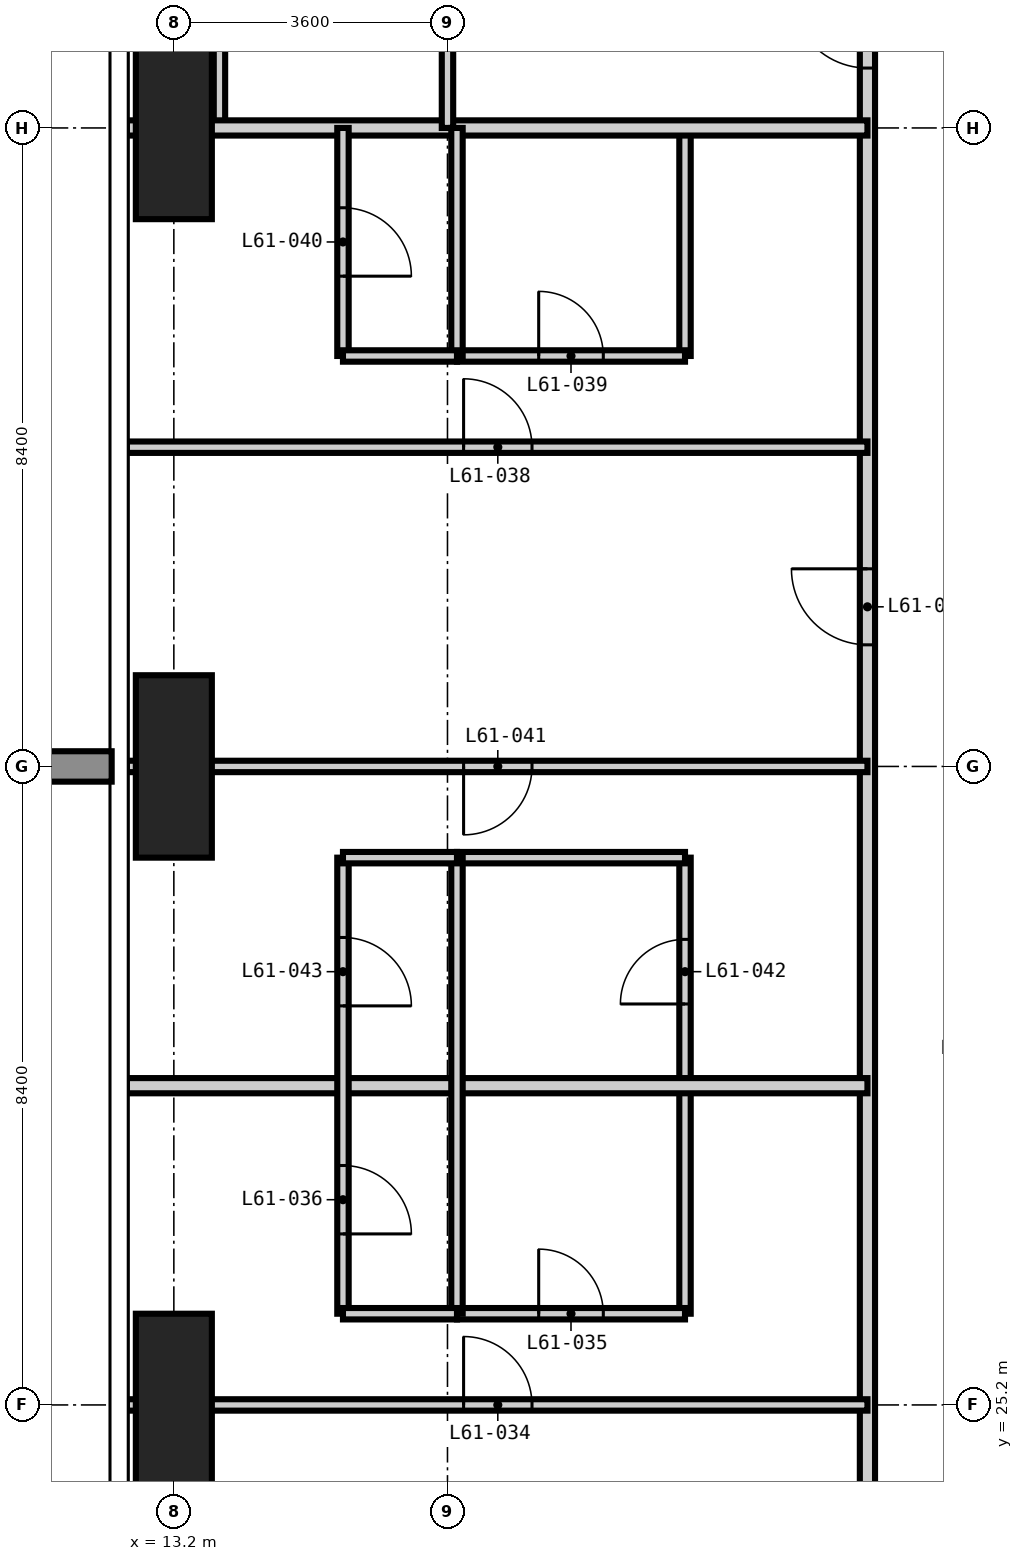
"""IFC4 building model, lengths in metres.
Left out: names, types, materials, properties, quantities, classifications, styles, units other than length and angle.
Written with IfcOpenShell. Run it as: python <this file> out.ifc"""

import sys

from ifc_helpers import new_model, si_unit, direction, frame, frame_2d, origin, origin_2d, place, context, subcontext, project, spatial, rectangle, extrude, element, fill, save


model = new_model("IFC4")
c1 = context("Model", 3, precision=1e-05, world=origin(), true_north=direction((0.0, 1.0)))
c2 = subcontext(c1, "Body", "Model", "MODEL_VIEW")
j1 = project(units=[si_unit("LENGTHUNIT", "METRE"), si_unit("PLANEANGLEUNIT", "RADIAN")], contexts=[c1])
p1 = place(None, origin())
s1 = spatial("IfcSite", under=j1, at=p1, CompositionType="ELEMENT")
p2 = place(p1, origin())
s2 = spatial("IfcBuilding", under=s1, at=p2, CompositionType="ELEMENT")
p3 = place(p2, frame((0.0, 0.0, 237.3)))
s3 = spatial("IfcBuildingStorey", under=s2, at=p3, CompositionType="ELEMENT", Elevation=237.3)
for number, where, z_axis, x_axis in (
    (1, (13.2, 25.2, -0.35), (0.0, 0.0, 1.0), (1.0, 0.0, 0.0)),
    (2, (13.2, 33.6, -0.35), (0.0, 0.0, 1.0), (1.0, 0.0, 0.0)),
    (3, (13.2, 42.0, -0.35), (0.0, 0.0, 1.0), (1.0, 0.0, 0.0)),
):
    element("IfcColumn", number, at=place(p3, frame(where, z_axis=z_axis, x_axis=x_axis)), inside=s3, PredefinedType="COLUMN", context=c2, shape_type="SweptSolid", body=[
        extrude(rectangle(XDim=1.0, YDim=2.4, at=origin_2d()), origin(), (0.0, 0.0, 1.0), 3.9),
    ])
p4 = place(p3, frame((13.8, 42.0, 0.0), z_axis=(0.0, 0.0, 1.0), x_axis=(0.0, 1.0, 0.0)))
e4 = element("IfcWall", 4, at=p4, inside=s3, PredefinedType="PARTITIONING", context=c2, shape_type="SweptSolid", body=[
    extrude(rectangle(XDim=3.6, YDim=0.15, at=frame_2d((1.8, 0.0))), origin(), (0.0, 0.0, 1.0), 3.55),
])
p5 = place(p4, frame((1.375, 0.0, 0.0)))
e5 = element("IfcOpeningElement", 5, at=p5, cuts=e4, PredefinedType="OPENING", context=c2, shape_type="SweptSolid", body=[
    extrude(rectangle(XDim=0.85, YDim=2.1, at=frame_2d((0.425, 1.05))), frame((0.0, 0.085, 0.0), z_axis=(0.0, -1.0, 0.0), x_axis=(1.0, 0.0, 0.0)), (0.0, 0.0, 1.0), 0.17),
])
p6 = place(p3, frame((19.925, 26.4, 0.0), z_axis=(0.0, 0.0, 1.0), x_axis=(0.0, 1.0, 0.0)))
e6 = element("IfcWall", 6, at=p6, inside=s3, PredefinedType="PARTITIONING", context=c2, shape_type="SweptSolid", body=[
    extrude(rectangle(XDim=6.0, YDim=0.15, at=frame_2d((3.0, 0.0))), origin(), (0.0, 0.0, 1.0), 3.55),
])
p7 = place(p6, frame((4.075, 0.0, 0.0)))
e7 = element("IfcOpeningElement", 7, at=p7, cuts=e6, PredefinedType="OPENING", context=c2, shape_type="SweptSolid", body=[
    extrude(rectangle(XDim=0.85, YDim=2.1, at=frame_2d((0.425, 1.05))), frame((0.0, 0.085, 0.0), z_axis=(0.0, -1.0, 0.0), x_axis=(1.0, 0.0, 0.0)), (0.0, 0.0, 1.0), 0.17),
])
p8 = place(p3, frame((19.925, 39.0, 0.0), z_axis=(0.0, 0.0, 1.0), x_axis=(0.0, 1.0, 0.0)))
e8 = element("IfcWall", 8, at=p8, inside=s3, PredefinedType="PARTITIONING", context=c2, shape_type="SweptSolid", body=[
    extrude(rectangle(XDim=3.0, YDim=0.15, at=frame_2d((1.5, 0.0))), origin(), (0.0, 0.0, 1.0), 3.55),
])
p9 = place(p3, frame((16.925, 26.4, 0.0), z_axis=(0.0, 0.0, 1.0), x_axis=(1.0, 0.0, 0.0)))
e9 = element("IfcWall", 9, at=p9, inside=s3, PredefinedType="PARTITIONING", context=c2, shape_type="SweptSolid", body=[
    extrude(rectangle(XDim=3.0, YDim=0.15, at=frame_2d((1.5, 0.0))), origin(), (0.0, 0.0, 1.0), 3.55),
])
p10 = place(p9, frame((1.075, 0.0, 0.0)))
e10 = element("IfcOpeningElement", 10, at=p10, cuts=e9, PredefinedType="OPENING", context=c2, shape_type="SweptSolid", body=[
    extrude(rectangle(XDim=0.85, YDim=2.1, at=frame_2d((0.425, 1.05))), frame((0.0, 0.085, 0.0), z_axis=(0.0, -1.0, 0.0), x_axis=(1.0, 0.0, 0.0)), (0.0, 0.0, 1.0), 0.17),
])
p11 = place(p3, frame((16.925, 32.4, 0.0), z_axis=(0.0, 0.0, 1.0), x_axis=(1.0, 0.0, 0.0)))
e11 = element("IfcWall", 11, at=p11, inside=s3, PredefinedType="PARTITIONING", context=c2, shape_type="SweptSolid", body=[
    extrude(rectangle(XDim=3.0, YDim=0.15, at=frame_2d((1.5, 0.0))), origin(), (0.0, 0.0, 1.0), 3.55),
])
p12 = place(p3, frame((16.925, 39.0, 0.0), z_axis=(0.0, 0.0, 1.0), x_axis=(1.0, 0.0, 0.0)))
e12 = element("IfcWall", 12, at=p12, inside=s3, PredefinedType="PARTITIONING", context=c2, shape_type="SweptSolid", body=[
    extrude(rectangle(XDim=3.0, YDim=0.15, at=frame_2d((1.5, 0.0))), origin(), (0.0, 0.0, 1.0), 3.55),
])
p13 = place(p12, frame((1.075, 0.0, 0.0)))
e13 = element("IfcOpeningElement", 13, at=p13, cuts=e12, PredefinedType="OPENING", context=c2, shape_type="SweptSolid", body=[
    extrude(rectangle(XDim=0.85, YDim=2.1, at=frame_2d((0.425, 1.05))), frame((0.0, 0.085, 0.0), z_axis=(0.0, -1.0, 0.0), x_axis=(1.0, 0.0, 0.0)), (0.0, 0.0, 1.0), 0.17),
])
p14 = place(p3, frame((22.325, 13.925, 0.0), z_axis=(0.0, 0.0, 1.0), x_axis=(0.0, 1.0, 0.0)))
e14 = element("IfcWall", 14, at=p14, inside=s3, PredefinedType="PARTITIONING", context=c2, shape_type="SweptSolid", body=[
    extrude(rectangle(XDim=30.65, YDim=0.2, at=frame_2d((15.325, 0.0))), origin(), (0.0, 0.0, 1.0), 3.55),
])
p15 = place(p14, frame((8.675, 0.0, 0.0)))
e15 = element("IfcOpeningElement", 15, at=p15, cuts=e14, PredefinedType="OPENING", context=c2, shape_type="SweptSolid", body=[
    extrude(rectangle(XDim=1.0, YDim=2.2, at=frame_2d((0.5, 1.1))), frame((0.0, 0.11, 0.0), z_axis=(0.0, -1.0, 0.0), x_axis=(1.0, 0.0, 0.0)), (0.0, 0.0, 1.0), 0.22),
])
p16 = place(p14, frame((21.275, 0.0, 0.0)))
e16 = element("IfcOpeningElement", 16, at=p16, cuts=e14, PredefinedType="OPENING", context=c2, shape_type="SweptSolid", body=[
    extrude(rectangle(XDim=1.0, YDim=2.2, at=frame_2d((0.5, 1.1))), frame((0.0, 0.11, 0.0), z_axis=(0.0, -1.0, 0.0), x_axis=(1.0, 0.0, 0.0)), (0.0, 0.0, 1.0), 0.22),
])
p17 = place(p14, frame((0.938, 0.0, 0.0)))
e17 = element("IfcOpeningElement", 17, at=p17, cuts=e14, PredefinedType="OPENING", context=c2, shape_type="SweptSolid", body=[
    extrude(rectangle(XDim=1.0, YDim=2.2, at=frame_2d((0.5, 1.1))), frame((0.0, 0.11, 0.0), z_axis=(0.0, -1.0, 0.0), x_axis=(1.0, 0.0, 0.0)), (0.0, 0.0, 1.0), 0.22),
])
p18 = place(p14, frame((28.863, 0.0, 0.0)))
e18 = element("IfcOpeningElement", 18, at=p18, cuts=e14, PredefinedType="OPENING", context=c2, shape_type="SweptSolid", body=[
    extrude(rectangle(XDim=1.0, YDim=2.2, at=frame_2d((0.5, 1.1))), frame((0.0, 0.11, 0.0), z_axis=(0.0, -1.0, 0.0), x_axis=(1.0, 0.0, 0.0)), (0.0, 0.0, 1.0), 0.22),
])
for number, where, z_axis, x_axis in (
    (19, (12.582, 29.4, 0.0), (0.0, 0.0, 1.0), (1.0, 0.0, 0.0)),
    (20, (12.582, 42.0, 0.0), (0.0, 0.0, 1.0), (1.0, 0.0, 0.0)),
):
    element("IfcWall", number, at=place(p3, frame(where, z_axis=z_axis, x_axis=x_axis)), inside=s3, PredefinedType="PARTITIONING", context=c2, shape_type="SweptSolid", body=[
        extrude(rectangle(XDim=9.743, YDim=0.2, at=frame_2d((4.872, 0.0))), origin(), (0.0, 0.0, 1.0), 3.55),
    ])
p19 = place(p3, frame((15.425, 26.4, 0.0), z_axis=(0.0, 0.0, 1.0), x_axis=(0.0, 1.0, 0.0)))
e21 = element("IfcWall", 21, at=p19, inside=s3, PredefinedType="PARTITIONING", context=c2, shape_type="SweptSolid", body=[
    extrude(rectangle(XDim=6.0, YDim=0.15, at=frame_2d((3.0, 0.0))), origin(), (0.0, 0.0, 1.0), 3.55),
])
p20 = place(p19, frame((1.05, 0.0, 0.0)))
e22 = element("IfcOpeningElement", 22, at=p20, cuts=e21, PredefinedType="OPENING", context=c2, shape_type="SweptSolid", body=[
    extrude(rectangle(XDim=0.9, YDim=2.1, at=frame_2d((0.45, 1.05))), frame((0.0, 0.085, 0.0), z_axis=(0.0, -1.0, 0.0), x_axis=(1.0, 0.0, 0.0)), (0.0, 0.0, 1.0), 0.17),
])
p21 = place(p19, frame((4.05, 0.0, 0.0)))
e23 = element("IfcOpeningElement", 23, at=p21, cuts=e21, PredefinedType="OPENING", context=c2, shape_type="SweptSolid", body=[
    extrude(rectangle(XDim=0.9, YDim=2.1, at=frame_2d((0.45, 1.05))), frame((0.0, 0.085, 0.0), z_axis=(0.0, -1.0, 0.0), x_axis=(1.0, 0.0, 0.0)), (0.0, 0.0, 1.0), 0.17),
])
p22 = place(p3, frame((15.425, 39.0, 0.0), z_axis=(0.0, 0.0, 1.0), x_axis=(0.0, 1.0, 0.0)))
e24 = element("IfcWall", 24, at=p22, inside=s3, PredefinedType="PARTITIONING", context=c2, shape_type="SweptSolid", body=[
    extrude(rectangle(XDim=3.0, YDim=0.15, at=frame_2d((1.5, 0.0))), origin(), (0.0, 0.0, 1.0), 3.55),
])
p23 = place(p22, frame((1.05, 0.0, 0.0)))
e25 = element("IfcOpeningElement", 25, at=p23, cuts=e24, PredefinedType="OPENING", context=c2, shape_type="SweptSolid", body=[
    extrude(rectangle(XDim=0.9, YDim=2.1, at=frame_2d((0.45, 1.05))), frame((0.0, 0.085, 0.0), z_axis=(0.0, -1.0, 0.0), x_axis=(1.0, 0.0, 0.0)), (0.0, 0.0, 1.0), 0.17),
])
p24 = place(p3, frame((16.8, 42.0, 0.0), z_axis=(0.0, 0.0, 1.0), x_axis=(0.0, 1.0, 0.0)))
e26 = element("IfcWall", 26, at=p24, inside=s3, PredefinedType="PARTITIONING", context=c2, shape_type="SweptSolid", body=[
    extrude(rectangle(XDim=12.618, YDim=0.15, at=frame_2d((6.309, 0.0))), origin(), (0.0, 0.0, 1.0), 3.55),
])
p25 = place(p24, frame((8.85, 0.0, 0.0)))
e27 = element("IfcOpeningElement", 27, at=p25, cuts=e26, PredefinedType="OPENING", context=c2, shape_type="SweptSolid", body=[
    extrude(rectangle(XDim=0.9, YDim=2.1, at=frame_2d((0.45, 1.05))), frame((0.0, 0.085, 0.0), z_axis=(0.0, -1.0, 0.0), x_axis=(1.0, 0.0, 0.0)), (0.0, 0.0, 1.0), 0.17),
])
p26 = place(p3, frame((16.925, 26.4, 0.0), z_axis=(0.0, 0.0, 1.0), x_axis=(0.0, 1.0, 0.0)))
e28 = element("IfcWall", 28, at=p26, inside=s3, PredefinedType="PARTITIONING", context=c2, shape_type="SweptSolid", body=[
    extrude(rectangle(XDim=6.0, YDim=0.15, at=frame_2d((3.0, 0.0))), origin(), (0.0, 0.0, 1.0), 3.55),
])
p27 = place(p3, frame((16.925, 39.0, 0.0), z_axis=(0.0, 0.0, 1.0), x_axis=(0.0, 1.0, 0.0)))
e29 = element("IfcWall", 29, at=p27, inside=s3, PredefinedType="PARTITIONING", context=c2, shape_type="SweptSolid", body=[
    extrude(rectangle(XDim=3.0, YDim=0.15, at=frame_2d((1.5, 0.0))), origin(), (0.0, 0.0, 1.0), 3.55),
])
p28 = place(p3, frame((12.582, 25.2, 0.0), z_axis=(0.0, 0.0, 1.0), x_axis=(1.0, 0.0, 0.0)))
e30 = element("IfcWall", 30, at=p28, inside=s3, PredefinedType="PARTITIONING", context=c2, shape_type="SweptSolid", body=[
    extrude(rectangle(XDim=9.743, YDim=0.15, at=frame_2d((4.872, 0.0))), origin(), (0.0, 0.0, 1.0), 3.55),
])
p29 = place(p28, frame((4.43, 0.0, 0.0)))
e31 = element("IfcOpeningElement", 31, at=p29, cuts=e30, PredefinedType="OPENING", context=c2, shape_type="SweptSolid", body=[
    extrude(rectangle(XDim=0.9, YDim=2.1, at=frame_2d((0.45, 1.05))), frame((0.0, 0.085, 0.0), z_axis=(0.0, -1.0, 0.0), x_axis=(1.0, 0.0, 0.0)), (0.0, 0.0, 1.0), 0.17),
])
for number, where, z_axis, x_axis in (
    (32, (15.425, 26.4, 0.0), (0.0, 0.0, 1.0), (1.0, 0.0, 0.0)),
    (33, (15.425, 32.4, 0.0), (0.0, 0.0, 1.0), (1.0, 0.0, 0.0)),
):
    element("IfcWall", number, at=place(p3, frame(where, z_axis=z_axis, x_axis=x_axis)), inside=s3, PredefinedType="PARTITIONING", context=c2, shape_type="SweptSolid", body=[
        extrude(rectangle(XDim=1.5, YDim=0.15, at=frame_2d((0.75, 0.0))), origin(), (0.0, 0.0, 1.0), 3.55),
    ])
p30 = place(p3, frame((12.582, 33.6, 0.0), z_axis=(0.0, 0.0, 1.0), x_axis=(1.0, 0.0, 0.0)))
e34 = element("IfcWall", 34, at=p30, inside=s3, PredefinedType="PARTITIONING", context=c2, shape_type="SweptSolid", body=[
    extrude(rectangle(XDim=9.743, YDim=0.15, at=frame_2d((4.872, 0.0))), origin(), (0.0, 0.0, 1.0), 3.55),
])
p31 = place(p30, frame((4.43, 0.0, 0.0)))
e35 = element("IfcOpeningElement", 35, at=p31, cuts=e34, PredefinedType="OPENING", context=c2, shape_type="SweptSolid", body=[
    extrude(rectangle(XDim=0.9, YDim=2.1, at=frame_2d((0.45, 1.05))), frame((0.0, 0.085, 0.0), z_axis=(0.0, -1.0, 0.0), x_axis=(1.0, 0.0, 0.0)), (0.0, 0.0, 1.0), 0.17),
])
p32 = place(p3, frame((12.582, 37.8, 0.0), z_axis=(0.0, 0.0, 1.0), x_axis=(1.0, 0.0, 0.0)))
e36 = element("IfcWall", 36, at=p32, inside=s3, PredefinedType="PARTITIONING", context=c2, shape_type="SweptSolid", body=[
    extrude(rectangle(XDim=9.743, YDim=0.15, at=frame_2d((4.872, 0.0))), origin(), (0.0, 0.0, 1.0), 3.55),
])
p33 = place(p32, frame((4.43, 0.0, 0.0)))
e37 = element("IfcOpeningElement", 37, at=p33, cuts=e36, PredefinedType="OPENING", context=c2, shape_type="SweptSolid", body=[
    extrude(rectangle(XDim=0.9, YDim=2.1, at=frame_2d((0.45, 1.05))), frame((0.0, 0.085, 0.0), z_axis=(0.0, -1.0, 0.0), x_axis=(1.0, 0.0, 0.0)), (0.0, 0.0, 1.0), 0.17),
])
p34 = place(p3, frame((15.425, 39.0, 0.0), z_axis=(0.0, 0.0, 1.0), x_axis=(1.0, 0.0, 0.0)))
e38 = element("IfcWall", 38, at=p34, inside=s3, PredefinedType="PARTITIONING", context=c2, shape_type="SweptSolid", body=[
    extrude(rectangle(XDim=1.5, YDim=0.15, at=frame_2d((0.75, 0.0))), origin(), (0.0, 0.0, 1.0), 3.55),
])
p35 = place(p29, origin())
e39 = element("IfcDoor", 39, at=p35, inside=s3, OperationType="SINGLE_SWING_LEFT", PredefinedType="DOOR", context=c2, shape_type="SweptSolid", body=[
    extrude(rectangle(XDim=0.9, YDim=2.1, at=frame_2d((0.45, 1.05))), frame((0.0, 0.025, 0.0), z_axis=(0.0, -1.0, 0.0), x_axis=(1.0, 0.0, 0.0)), (0.0, 0.0, 1.0), 0.05),
])
fill(e31, e39)
p36 = place(p10, origin())
e40 = element("IfcDoor", 40, at=p36, inside=s3, OperationType="SINGLE_SWING_LEFT", PredefinedType="DOOR", context=c2, shape_type="SweptSolid", body=[
    extrude(rectangle(XDim=0.85, YDim=2.1, at=frame_2d((0.425, 1.05))), frame((0.0, 0.025, 0.0), z_axis=(0.0, -1.0, 0.0), x_axis=(1.0, 0.0, 0.0)), (0.0, 0.0, 1.0), 0.05),
])
fill(e10, e40)
p37 = place(p20, frame((0.9, 0.0, 0.0), z_axis=(0.0, 0.0, 1.0), x_axis=(-1.0, 0.0, 0.0)))
e41 = element("IfcDoor", 41, at=p37, inside=s3, OperationType="SINGLE_SWING_RIGHT", PredefinedType="DOOR", context=c2, shape_type="SweptSolid", body=[
    extrude(rectangle(XDim=0.9, YDim=2.1, at=frame_2d((0.45, 1.05))), frame((0.0, 0.025, 0.0), z_axis=(0.0, -1.0, 0.0), x_axis=(1.0, 0.0, 0.0)), (0.0, 0.0, 1.0), 0.05),
])
fill(e22, e41)
p38 = place(p16, origin())
e42 = element("IfcDoor", 42, at=p38, inside=s3, OperationType="SINGLE_SWING_RIGHT", PredefinedType="DOOR", context=c2, shape_type="SweptSolid", body=[
    extrude(rectangle(XDim=1.0, YDim=2.2, at=frame_2d((0.5, 1.1))), frame((0.0, 0.025, 0.0), z_axis=(0.0, -1.0, 0.0), x_axis=(1.0, 0.0, 0.0)), (0.0, 0.0, 1.0), 0.05),
])
fill(e16, e42)
p39 = place(p33, origin())
e43 = element("IfcDoor", 43, at=p39, inside=s3, OperationType="SINGLE_SWING_LEFT", PredefinedType="DOOR", context=c2, shape_type="SweptSolid", body=[
    extrude(rectangle(XDim=0.9, YDim=2.1, at=frame_2d((0.45, 1.05))), frame((0.0, 0.025, 0.0), z_axis=(0.0, -1.0, 0.0), x_axis=(1.0, 0.0, 0.0)), (0.0, 0.0, 1.0), 0.05),
])
fill(e37, e43)
p40 = place(p13, origin())
e44 = element("IfcDoor", 44, at=p40, inside=s3, OperationType="SINGLE_SWING_LEFT", PredefinedType="DOOR", context=c2, shape_type="SweptSolid", body=[
    extrude(rectangle(XDim=0.85, YDim=2.1, at=frame_2d((0.425, 1.05))), frame((0.0, 0.025, 0.0), z_axis=(0.0, -1.0, 0.0), x_axis=(1.0, 0.0, 0.0)), (0.0, 0.0, 1.0), 0.05),
])
fill(e13, e44)
p41 = place(p23, frame((0.9, 0.0, 0.0), z_axis=(0.0, 0.0, 1.0), x_axis=(-1.0, 0.0, 0.0)))
e45 = element("IfcDoor", 45, at=p41, inside=s3, OperationType="SINGLE_SWING_RIGHT", PredefinedType="DOOR", context=c2, shape_type="SweptSolid", body=[
    extrude(rectangle(XDim=0.9, YDim=2.1, at=frame_2d((0.45, 1.05))), frame((0.0, 0.025, 0.0), z_axis=(0.0, -1.0, 0.0), x_axis=(1.0, 0.0, 0.0)), (0.0, 0.0, 1.0), 0.05),
])
fill(e25, e45)
p42 = place(p31, frame((0.9, 0.0, 0.0), z_axis=(0.0, 0.0, 1.0), x_axis=(-1.0, 0.0, 0.0)))
e46 = element("IfcDoor", 46, at=p42, inside=s3, OperationType="SINGLE_SWING_RIGHT", PredefinedType="DOOR", context=c2, shape_type="SweptSolid", body=[
    extrude(rectangle(XDim=0.9, YDim=2.1, at=frame_2d((0.45, 1.05))), frame((0.0, 0.025, 0.0), z_axis=(0.0, -1.0, 0.0), x_axis=(1.0, 0.0, 0.0)), (0.0, 0.0, 1.0), 0.05),
])
fill(e35, e46)
p43 = place(p7, origin())
e47 = element("IfcDoor", 47, at=p43, inside=s3, OperationType="SINGLE_SWING_LEFT", PredefinedType="DOOR", context=c2, shape_type="SweptSolid", body=[
    extrude(rectangle(XDim=0.85, YDim=2.1, at=frame_2d((0.425, 1.05))), frame((0.0, 0.025, 0.0), z_axis=(0.0, -1.0, 0.0), x_axis=(1.0, 0.0, 0.0)), (0.0, 0.0, 1.0), 0.05),
])
fill(e7, e47)
p44 = place(p21, frame((0.9, 0.0, 0.0), z_axis=(0.0, 0.0, 1.0), x_axis=(-1.0, 0.0, 0.0)))
e48 = element("IfcDoor", 48, at=p44, inside=s3, OperationType="SINGLE_SWING_RIGHT", PredefinedType="DOOR", context=c2, shape_type="SweptSolid", body=[
    extrude(rectangle(XDim=0.9, YDim=2.1, at=frame_2d((0.45, 1.05))), frame((0.0, 0.025, 0.0), z_axis=(0.0, -1.0, 0.0), x_axis=(1.0, 0.0, 0.0)), (0.0, 0.0, 1.0), 0.05),
])
fill(e23, e48)
p45 = place(p18, origin())
e49 = element("IfcDoor", 49, at=p45, inside=s3, OperationType="SINGLE_SWING_RIGHT", PredefinedType="DOOR", context=c2, shape_type="SweptSolid", body=[
    extrude(rectangle(XDim=1.0, YDim=2.2, at=frame_2d((0.5, 1.1))), frame((0.0, 0.025, 0.0), z_axis=(0.0, -1.0, 0.0), x_axis=(1.0, 0.0, 0.0)), (0.0, 0.0, 1.0), 0.05),
])
fill(e18, e49)
save(model, sys.argv[1])
